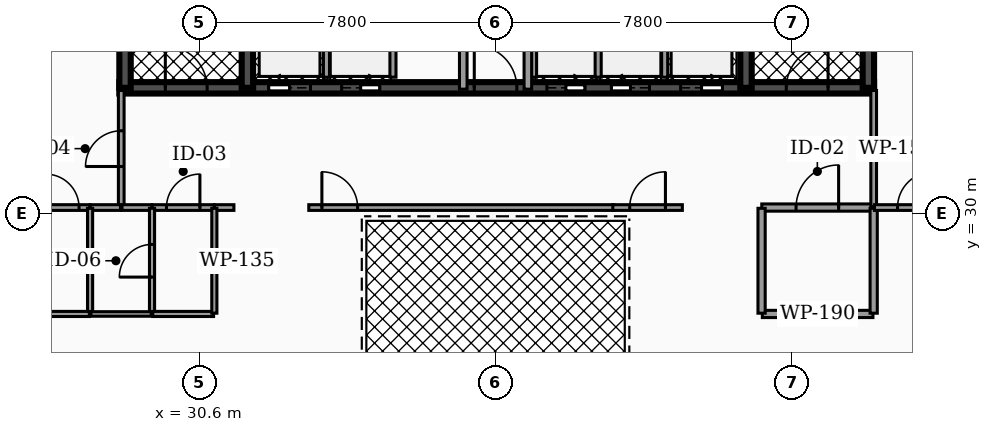
"""IFC4 building model, lengths in metres.
Left out: names, types, materials, properties, quantities, classifications, styles, units other than length and angle.
Written with IfcOpenShell. Run it as: python <this file> out.ifc"""

import sys

from ifc_helpers import new_model, si_unit, direction, frame, frame_2d, origin, place, context, subcontext, project, spatial, rectangle, extrude, element, fill, save


model = new_model("IFC4")
c1 = context("Model", 3, precision=1e-05, world=origin(), true_north=direction((0.0, 1.0)))
c2 = subcontext(c1, "Body", "Model", "MODEL_VIEW")
j1 = project(units=[si_unit("LENGTHUNIT", "METRE"), si_unit("PLANEANGLEUNIT", "RADIAN")], contexts=[c1])
p1 = place(None, origin())
s1 = spatial("IfcSite", under=j1, at=p1, CompositionType="ELEMENT")
p2 = place(p1, origin())
s2 = spatial("IfcBuilding", under=s1, at=p2, CompositionType="ELEMENT")
p3 = place(p2, frame((0.0, 0.0, 222.36)))
s3 = spatial("IfcBuildingStorey", under=s2, at=p3, CompositionType="ELEMENT", Elevation=222.36)
p4 = place(p3, frame((28.5, 33.3, 0.0), z_axis=(0.0, 0.0, 1.0), x_axis=(1.0, 0.0, 0.0)))
e1 = element("IfcWall", 1, at=p4, inside=s3, PredefinedType="SHEAR", context=c2, shape_type="SweptSolid", body=[
    extrude(rectangle(XDim=19.86, YDim=0.3, at=frame_2d((9.93, 0.0))), origin(), (0.0, 0.0, 1.0), 3.18),
])
p5 = place(p4, frame((3.93, 0.0, 0.0)))
e2 = element("IfcOpeningElement", 2, at=p5, cuts=e1, PredefinedType="OPENING", context=c2, shape_type="SweptSolid", body=[
    extrude(rectangle(XDim=1.1, YDim=2.15, at=frame_2d((0.55, 1.075))), frame((0.0, 0.16, 0.0), z_axis=(0.0, -1.0, 0.0), x_axis=(1.0, 0.0, 0.0)), (0.0, 0.0, 1.0), 0.32),
])
p6 = place(p4, frame((14.77, 0.0, 0.0)))
e3 = element("IfcOpeningElement", 3, at=p6, cuts=e1, PredefinedType="OPENING", context=c2, shape_type="SweptSolid", body=[
    extrude(rectangle(XDim=1.1, YDim=2.15, at=frame_2d((0.55, 1.075))), frame((0.0, 0.16, 0.0), z_axis=(0.0, -1.0, 0.0), x_axis=(1.0, 0.0, 0.0)), (0.0, 0.0, 1.0), 0.32),
])
p7 = place(p4, frame((11.25, 0.0, 0.0)))
e4 = element("IfcOpeningElement", 4, at=p7, cuts=e1, PredefinedType="OPENING", context=c2, shape_type="SweptSolid", body=[
    extrude(rectangle(XDim=1.0, YDim=2.1, at=frame_2d((0.5, 1.05))), frame((0.0, 0.16, 0.0), z_axis=(0.0, -1.0, 0.0), x_axis=(1.0, 0.0, 0.0)), (0.0, 0.0, 1.0), 0.32),
])
p8 = place(p4, frame((12.95, 0.0, 0.0)))
e5 = element("IfcOpeningElement", 5, at=p8, cuts=e1, PredefinedType="OPENING", context=c2, shape_type="SweptSolid", body=[
    extrude(rectangle(XDim=1.0, YDim=2.1, at=frame_2d((0.5, 1.05))), frame((0.0, 0.16, 0.0), z_axis=(0.0, -1.0, 0.0), x_axis=(1.0, 0.0, 0.0)), (0.0, 0.0, 1.0), 0.32),
])
p9 = place(p4, frame((5.85, 0.0, 0.0)))
e6 = element("IfcOpeningElement", 6, at=p9, cuts=e1, PredefinedType="OPENING", context=c2, shape_type="SweptSolid", body=[
    extrude(rectangle(XDim=1.0, YDim=2.1, at=frame_2d((0.5, 1.05))), frame((0.0, 0.16, 0.0), z_axis=(0.0, -1.0, 0.0), x_axis=(1.0, 0.0, 0.0)), (0.0, 0.0, 1.0), 0.32),
])
p10 = place(p4, frame((1.21, 0.0, 0.0)))
e7 = element("IfcOpeningElement", 7, at=p10, cuts=e1, PredefinedType="OPENING", context=c2, shape_type="SweptSolid", body=[
    extrude(rectangle(XDim=1.1, YDim=2.2, at=frame_2d((0.55, 1.1))), frame((0.0, 0.16, 0.0), z_axis=(0.0, -1.0, 0.0), x_axis=(1.0, 0.0, 0.0)), (0.0, 0.0, 1.0), 0.32),
])
p11 = place(p4, frame((9.34, 0.0, 0.0)))
e8 = element("IfcOpeningElement", 8, at=p11, cuts=e1, PredefinedType="OPENING", context=c2, shape_type="SweptSolid", body=[
    extrude(rectangle(XDim=1.12, YDim=2.05, at=frame_2d((0.56, 1.025))), frame((0.0, 0.16, 0.0), z_axis=(0.0, -1.0, 0.0), x_axis=(1.0, 0.0, 0.0)), (0.0, 0.0, 1.0), 0.32),
])
p12 = place(p4, frame((17.55, 0.0, 0.0)))
e9 = element("IfcOpeningElement", 9, at=p12, cuts=e1, PredefinedType="OPENING", context=c2, shape_type="SweptSolid", body=[
    extrude(rectangle(XDim=1.1, YDim=2.2, at=frame_2d((0.55, 1.1))), frame((0.0, 0.16, 0.0), z_axis=(0.0, -1.0, 0.0), x_axis=(1.0, 0.0, 0.0)), (0.0, 0.0, 1.0), 0.32),
])
for number, where, z_axis, x_axis in (
    (10, (28.65, 33.3, 0.0), (0.0, 0.0, 1.0), (0.0, 1.0, 0.0)),
    (11, (31.87, 33.3, 0.0), (0.0, 0.0, 1.0), (0.0, 1.0, 0.0)),
    (12, (44.99, 33.3, 0.0), (0.0, 0.0, 1.0), (0.0, 1.0, 0.0)),
    (13, (48.21, 33.3, 0.0), (0.0, 0.0, 1.0), (0.0, 1.0, 0.0)),
):
    element("IfcWall", number, at=place(p3, frame(where, z_axis=z_axis, x_axis=x_axis)), inside=s3, PredefinedType="SHEAR", context=c2, shape_type="SweptSolid", body=[
        extrude(rectangle(XDim=10.1, YDim=0.3, at=frame_2d((5.05, 0.0))), origin(), (0.0, 0.0, 1.0), 3.18),
    ])
for number, where, z_axis, x_axis in (
    (14, (33.95, 33.58, 0.0), (0.0, 0.0, 1.0), (0.0, 1.0, 0.0)),
    (15, (42.85, 33.58, 0.0), (0.0, 0.0, 1.0), (0.0, 1.0, 0.0)),
):
    element("IfcWall", number, at=place(p3, frame(where, z_axis=z_axis, x_axis=x_axis)), inside=s3, PredefinedType="SOLIDWALL", context=c2, shape_type="SweptSolid", body=[
        extrude(rectangle(XDim=2.45, YDim=0.16, at=frame_2d((1.225, 0.0))), origin(), (0.0, 0.0, 1.0), 3.18),
    ])
for number, where, z_axis, x_axis in (
    (16, (39.4, 33.58, 0.0), (0.0, 0.0, 1.0), (0.0, 1.0, 0.0)),
    (17, (41.1, 33.58, 0.0), (0.0, 0.0, 1.0), (0.0, 1.0, 0.0)),
    (18, (35.7, 33.58, 0.0), (0.0, 0.0, 1.0), (0.0, 1.0, 0.0)),
):
    element("IfcWall", number, at=place(p3, frame(where, z_axis=z_axis, x_axis=x_axis)), inside=s3, PredefinedType="SOLIDWALL", context=c2, shape_type="SweptSolid", body=[
        extrude(rectangle(XDim=2.25, YDim=0.16, at=frame_2d((1.125, 0.0))), origin(), (0.0, 0.0, 1.0), 3.18),
    ])
p13 = place(p3, frame((37.55, 33.265, 0.0), z_axis=(0.0, 0.0, 1.0), x_axis=(0.0, 1.0, 0.0)))
e19 = element("IfcWall", 19, at=p13, inside=s3, PredefinedType="PARTITIONING", context=c2, shape_type="SweptSolid", body=[
    extrude(rectangle(XDim=3.615, YDim=0.2, at=frame_2d((1.808, 0.0))), origin(), (0.0, 0.0, 1.0), 2.235),
])
p14 = place(p13, frame((1.367, 0.0, 0.0)))
e20 = element("IfcOpeningElement", 20, at=p14, cuts=e19, PredefinedType="OPENING", context=c2, shape_type="SweptSolid", body=[
    extrude(rectangle(XDim=0.88, YDim=2.05, at=frame_2d((0.44, 1.025))), frame((0.0, 0.11, 0.0), z_axis=(0.0, -1.0, 0.0), x_axis=(1.0, 0.0, 0.0)), (0.0, 0.0, 1.0), 0.22),
])
p15 = place(p3, frame((39.25, 33.265, 0.0), z_axis=(0.0, 0.0, 1.0), x_axis=(0.0, 1.0, 0.0)))
e21 = element("IfcWall", 21, at=p15, inside=s3, PredefinedType="PARTITIONING", context=c2, shape_type="SweptSolid", body=[
    extrude(rectangle(XDim=3.615, YDim=0.2, at=frame_2d((1.808, 0.0))), origin(), (0.0, 0.0, 1.0), 2.235),
])
p16 = place(p3, frame((45.405, 30.15, 0.0), z_axis=(0.0, 0.0, 1.0), x_axis=(1.0, 0.0, 0.0)))
e22 = element("IfcWall", 22, at=p16, inside=s3, PredefinedType="PARTITIONING", context=c2, shape_type="SweptSolid", body=[
    extrude(rectangle(XDim=2.925, YDim=0.19, at=frame_2d((1.462, 0.0))), origin(), (0.0, 0.0, 1.0), 2.235),
])
p17 = place(p16, frame((0.903, 0.0, 0.0)))
e23 = element("IfcOpeningElement", 23, at=p17, cuts=e22, PredefinedType="OPENING", context=c2, shape_type="SweptSolid", body=[
    extrude(rectangle(XDim=1.12, YDim=2.05, at=frame_2d((0.56, 1.025))), frame((0.0, 0.105, 0.0), z_axis=(0.0, -1.0, 0.0), x_axis=(1.0, 0.0, 0.0)), (0.0, 0.0, 1.0), 0.21),
])
p18 = place(p3, frame((28.55, 30.17, 0.0), z_axis=(0.0, 0.0, 1.0), x_axis=(0.0, 1.0, 0.0)))
e24 = element("IfcWall", 24, at=p18, inside=s3, PredefinedType="PARTITIONING", context=c2, shape_type="SweptSolid", body=[
    extrude(rectangle(XDim=3.06, YDim=0.15, at=frame_2d((1.53, 0.0))), origin(), (0.0, 0.0, 1.0), 2.235),
])
p19 = place(p18, frame((1.06, 0.0, 0.0)))
e25 = element("IfcOpeningElement", 25, at=p19, cuts=e24, PredefinedType="OPENING", context=c2, shape_type="SweptSolid", body=[
    extrude(rectangle(XDim=0.94, YDim=2.05, at=frame_2d((0.47, 1.025))), frame((0.0, 0.085, 0.0), z_axis=(0.0, -1.0, 0.0), x_axis=(1.0, 0.0, 0.0)), (0.0, 0.0, 1.0), 0.17),
])
p20 = place(p3, frame((48.35, 30.17, 0.0), z_axis=(0.0, 0.0, 1.0), x_axis=(0.0, 1.0, 0.0)))
e26 = element("IfcWall", 26, at=p20, inside=s3, PredefinedType="PARTITIONING", context=c2, shape_type="SweptSolid", body=[
    extrude(rectangle(XDim=3.06, YDim=0.15, at=frame_2d((1.53, 0.0))), origin(), (0.0, 0.0, 1.0), 2.235),
])
p21 = place(p3, frame((29.365, 30.15, 0.0), z_axis=(0.0, 0.0, 1.0), x_axis=(1.0, 0.0, 0.0)))
e27 = element("IfcWall", 27, at=p21, inside=s3, PredefinedType="PARTITIONING", context=c2, shape_type="SweptSolid", body=[
    extrude(rectangle(XDim=1.63, YDim=0.15, at=frame_2d((0.815, 0.0))), origin(), (0.0, 0.0, 1.0), 2.235),
])
p22 = place(p21, frame((0.375, 0.0, 0.0)))
e28 = element("IfcOpeningElement", 28, at=p22, cuts=e27, PredefinedType="OPENING", context=c2, shape_type="SweptSolid", body=[
    extrude(rectangle(XDim=0.88, YDim=2.05, at=frame_2d((0.44, 1.025))), frame((0.0, 0.085, 0.0), z_axis=(0.0, -1.0, 0.0), x_axis=(1.0, 0.0, 0.0)), (0.0, 0.0, 1.0), 0.17),
])
p23 = place(p3, frame((28.57, 30.15, 0.0), z_axis=(0.0, 0.0, 1.0), x_axis=(1.0, 0.0, 0.0)))
e29 = element("IfcWall", 29, at=p23, inside=s3, PredefinedType="PARTITIONING", context=c2, shape_type="SweptSolid", body=[
    extrude(rectangle(XDim=0.785, YDim=0.15, at=frame_2d((0.393, 0.0))), origin(), (0.0, 0.0, 1.0), 2.235),
])
p24 = place(p3, frame((33.485, 30.15, 0.0), z_axis=(0.0, 0.0, 1.0), x_axis=(1.0, 0.0, 0.0)))
e30 = element("IfcWall", 30, at=p24, inside=s3, PredefinedType="PARTITIONING", context=c2, shape_type="SweptSolid", body=[
    extrude(rectangle(XDim=8.03, YDim=0.15, at=frame_2d((4.015, 0.0))), origin(), (0.0, 0.0, 1.0), 2.235),
])
p25 = place(p24, frame((0.345, 0.0, 0.0)))
e31 = element("IfcOpeningElement", 31, at=p25, cuts=e30, PredefinedType="OPENING", context=c2, shape_type="SweptSolid", body=[
    extrude(rectangle(XDim=0.94, YDim=2.05, at=frame_2d((0.47, 1.025))), frame((0.0, 0.085, 0.0), z_axis=(0.0, -1.0, 0.0), x_axis=(1.0, 0.0, 0.0)), (0.0, 0.0, 1.0), 0.17),
])
p26 = place(p3, frame((31.005, 30.15, 0.0), z_axis=(0.0, 0.0, 1.0), x_axis=(1.0, 0.0, 0.0)))
e32 = element("IfcWall", 32, at=p26, inside=s3, PredefinedType="PARTITIONING", context=c2, shape_type="SweptSolid", body=[
    extrude(rectangle(XDim=0.51, YDim=0.15, at=frame_2d((0.255, 0.0))), origin(), (0.0, 0.0, 1.0), 2.235),
])
p27 = place(p3, frame((41.485, 30.15, 0.0), z_axis=(0.0, 0.0, 1.0), x_axis=(1.0, 0.0, 0.0)))
e33 = element("IfcWall", 33, at=p27, inside=s3, PredefinedType="PARTITIONING", context=c2, shape_type="SweptSolid", body=[
    extrude(rectangle(XDim=1.83, YDim=0.15, at=frame_2d((0.915, 0.0))), origin(), (0.0, 0.0, 1.0), 2.235),
])
p28 = place(p27, frame((0.445, 0.0, 0.0)))
e34 = element("IfcOpeningElement", 34, at=p28, cuts=e33, PredefinedType="OPENING", context=c2, shape_type="SweptSolid", body=[
    extrude(rectangle(XDim=0.94, YDim=2.05, at=frame_2d((0.47, 1.025))), frame((0.0, 0.085, 0.0), z_axis=(0.0, -1.0, 0.0), x_axis=(1.0, 0.0, 0.0)), (0.0, 0.0, 1.0), 0.17),
])
p29 = place(p3, frame((45.42, 27.35, 0.0), z_axis=(0.0, 0.0, 1.0), x_axis=(1.0, 0.0, 0.0)))
e35 = element("IfcWall", 35, at=p29, inside=s3, PredefinedType="PARTITIONING", context=c2, shape_type="SweptSolid", body=[
    extrude(rectangle(XDim=2.91, YDim=0.19, at=frame_2d((1.455, 0.0))), origin(), (0.0, 0.0, 1.0), 2.235),
])
for number, where, z_axis, x_axis in (
    (36, (45.4, 27.37, 0.0), (0.0, 0.0, 1.0), (0.0, 1.0, 0.0)),
    (37, (48.35, 27.37, 0.0), (0.0, 0.0, 1.0), (0.0, 1.0, 0.0)),
):
    element("IfcWall", number, at=place(p3, frame(where, z_axis=z_axis, x_axis=x_axis)), inside=s3, PredefinedType="PARTITIONING", context=c2, shape_type="SweptSolid", body=[
        extrude(rectangle(XDim=2.76, YDim=0.19, at=frame_2d((1.38, 0.0))), origin(), (0.0, 0.0, 1.0), 2.235),
    ])
p30 = place(p3, frame((26.275, 30.15, 0.0), z_axis=(0.0, 0.0, 1.0), x_axis=(1.0, 0.0, 0.0)))
e38 = element("IfcWall", 38, at=p30, inside=s3, PredefinedType="PARTITIONING", context=c2, shape_type="SweptSolid", body=[
    extrude(rectangle(XDim=1.45, YDim=0.15, at=frame_2d((0.725, 0.0))), origin(), (0.0, 0.0, 1.0), 2.235),
])
p31 = place(p30, frame((0.285, 0.0, 0.0)))
e39 = element("IfcOpeningElement", 39, at=p31, cuts=e38, PredefinedType="OPENING", context=c2, shape_type="SweptSolid", body=[
    extrude(rectangle(XDim=0.88, YDim=2.05, at=frame_2d((0.44, 1.025))), frame((0.0, 0.085, 0.0), z_axis=(0.0, -1.0, 0.0), x_axis=(1.0, 0.0, 0.0)), (0.0, 0.0, 1.0), 0.17),
])
p32 = place(p3, frame((27.735, 30.15, 0.0), z_axis=(0.0, 0.0, 1.0), x_axis=(1.0, 0.0, 0.0)))
e40 = element("IfcWall", 40, at=p32, inside=s3, PredefinedType="PARTITIONING", context=c2, shape_type="SweptSolid", body=[
    extrude(rectangle(XDim=0.795, YDim=0.15, at=frame_2d((0.397, 0.0))), origin(), (0.0, 0.0, 1.0), 2.235),
])
p33 = place(p3, frame((48.37, 30.15, 0.0), z_axis=(0.0, 0.0, 1.0), x_axis=(1.0, 0.0, 0.0)))
e41 = element("IfcWall", 41, at=p33, inside=s3, PredefinedType="PARTITIONING", context=c2, shape_type="SweptSolid", body=[
    extrude(rectangle(XDim=2.155, YDim=0.15, at=frame_2d((1.078, 0.0))), origin(), (0.0, 0.0, 1.0), 2.235),
])
p34 = place(p33, frame((0.608, 0.0, 0.0)))
e42 = element("IfcOpeningElement", 42, at=p34, cuts=e41, PredefinedType="OPENING", context=c2, shape_type="SweptSolid", body=[
    extrude(rectangle(XDim=0.94, YDim=2.05, at=frame_2d((0.47, 1.025))), frame((0.0, 0.085, 0.0), z_axis=(0.0, -1.0, 0.0), x_axis=(1.0, 0.0, 0.0)), (0.0, 0.0, 1.0), 0.17),
])
p35 = place(p3, frame((29.36, 27.37, 0.0), z_axis=(0.0, 0.0, 1.0), x_axis=(0.0, 1.0, 0.0)))
e43 = element("IfcWall", 43, at=p35, inside=s3, PredefinedType="PARTITIONING", context=c2, shape_type="SweptSolid", body=[
    extrude(rectangle(XDim=2.76, YDim=0.135, at=frame_2d((1.38, 0.0))), origin(), (0.0, 0.0, 1.0), 2.235),
])
p36 = place(p35, frame((0.95, 0.0, 0.0)))
e44 = element("IfcOpeningElement", 44, at=p36, cuts=e43, PredefinedType="OPENING", context=c2, shape_type="SweptSolid", body=[
    extrude(rectangle(XDim=0.86, YDim=2.05, at=frame_2d((0.43, 1.025))), frame((0.0, 0.077, 0.0), z_axis=(0.0, -1.0, 0.0), x_axis=(1.0, 0.0, 0.0)), (0.0, 0.0, 1.0), 0.155),
])
p37 = place(p3, frame((29.38, 27.35, 0.0), z_axis=(0.0, 0.0, 1.0), x_axis=(1.0, 0.0, 0.0)))
e45 = element("IfcWall", 45, at=p37, inside=s3, PredefinedType="PARTITIONING", context=c2, shape_type="SweptSolid", body=[
    extrude(rectangle(XDim=1.6, YDim=0.135, at=frame_2d((0.8, 0.0))), origin(), (0.0, 0.0, 1.0), 2.235),
])
for number, where, z_axis, x_axis in (
    (46, (31.0, 27.37, 0.0), (0.0, 0.0, 1.0), (0.0, 1.0, 0.0)),
    (47, (27.73, 27.37, 0.0), (0.0, 0.0, 1.0), (0.0, 1.0, 0.0)),
):
    element("IfcWall", number, at=place(p3, frame(where, z_axis=z_axis, x_axis=x_axis)), inside=s3, PredefinedType="PARTITIONING", context=c2, shape_type="SweptSolid", body=[
        extrude(rectangle(XDim=2.76, YDim=0.135, at=frame_2d((1.38, 0.0))), origin(), (0.0, 0.0, 1.0), 2.235),
    ])
p38 = place(p3, frame((26.12, 27.35, 0.0), z_axis=(0.0, 0.0, 1.0), x_axis=(1.0, 0.0, 0.0)))
e48 = element("IfcWall", 48, at=p38, inside=s3, PredefinedType="PARTITIONING", context=c2, shape_type="SweptSolid", body=[
    extrude(rectangle(XDim=1.59, YDim=0.135, at=frame_2d((0.795, 0.0))), origin(), (0.0, 0.0, 1.0), 2.235),
])
p39 = place(p3, frame((27.75, 27.35, 0.0), z_axis=(0.0, 0.0, 1.0), x_axis=(1.0, 0.0, 0.0)))
e49 = element("IfcWall", 49, at=p39, inside=s3, PredefinedType="PARTITIONING", context=c2, shape_type="SweptSolid", body=[
    extrude(rectangle(XDim=1.59, YDim=0.12, at=frame_2d((0.795, 0.0))), origin(), (0.0, 0.0, 1.0), 2.235),
])
p40 = place(p5, origin())
e50 = element("IfcDoor", 50, at=p40, inside=s3, OperationType="SLIDING_TO_LEFT", PredefinedType="DOOR", context=c2, shape_type="SweptSolid", body=[
    extrude(rectangle(XDim=1.1, YDim=2.15, at=frame_2d((0.55, 1.075))), frame((0.0, 0.025, 0.0), z_axis=(0.0, -1.0, 0.0), x_axis=(1.0, 0.0, 0.0)), (0.0, 0.0, 1.0), 0.05),
])
fill(e2, e50)
p41 = place(p6, origin())
e51 = element("IfcDoor", 51, at=p41, inside=s3, OperationType="SLIDING_TO_RIGHT", PredefinedType="DOOR", context=c2, shape_type="SweptSolid", body=[
    extrude(rectangle(XDim=1.1, YDim=2.15, at=frame_2d((0.55, 1.075))), frame((0.0, 0.025, 0.0), z_axis=(0.0, -1.0, 0.0), x_axis=(1.0, 0.0, 0.0)), (0.0, 0.0, 1.0), 0.05),
])
fill(e3, e51)
p42 = place(p7, origin())
e52 = element("IfcDoor", 52, at=p42, inside=s3, OperationType="SLIDING_TO_RIGHT", PredefinedType="DOOR", context=c2, shape_type="SweptSolid", body=[
    extrude(rectangle(XDim=1.0, YDim=2.1, at=frame_2d((0.5, 1.05))), frame((0.0, 0.025, 0.0), z_axis=(0.0, -1.0, 0.0), x_axis=(1.0, 0.0, 0.0)), (0.0, 0.0, 1.0), 0.05),
])
fill(e4, e52)
p43 = place(p8, origin())
e53 = element("IfcDoor", 53, at=p43, inside=s3, OperationType="SLIDING_TO_LEFT", PredefinedType="DOOR", context=c2, shape_type="SweptSolid", body=[
    extrude(rectangle(XDim=1.0, YDim=2.1, at=frame_2d((0.5, 1.05))), frame((0.0, 0.025, 0.0), z_axis=(0.0, -1.0, 0.0), x_axis=(1.0, 0.0, 0.0)), (0.0, 0.0, 1.0), 0.05),
])
fill(e5, e53)
p44 = place(p9, origin())
e54 = element("IfcDoor", 54, at=p44, inside=s3, OperationType="SLIDING_TO_RIGHT", PredefinedType="DOOR", context=c2, shape_type="SweptSolid", body=[
    extrude(rectangle(XDim=1.0, YDim=2.1, at=frame_2d((0.5, 1.05))), frame((0.0, 0.025, 0.0), z_axis=(0.0, -1.0, 0.0), x_axis=(1.0, 0.0, 0.0)), (0.0, 0.0, 1.0), 0.05),
])
fill(e6, e54)
p45 = place(p10, origin())
e55 = element("IfcDoor", 55, at=p45, inside=s3, OperationType="SINGLE_SWING_LEFT", PredefinedType="DOOR", context=c2, shape_type="SweptSolid", body=[
    extrude(rectangle(XDim=1.1, YDim=2.2, at=frame_2d((0.55, 1.1))), frame((0.0, 0.025, 0.0), z_axis=(0.0, -1.0, 0.0), x_axis=(1.0, 0.0, 0.0)), (0.0, 0.0, 1.0), 0.05),
])
fill(e7, e55)
p46 = place(p11, origin())
e56 = element("IfcDoor", 56, at=p46, inside=s3, OperationType="SINGLE_SWING_LEFT", PredefinedType="DOOR", context=c2, shape_type="SweptSolid", body=[
    extrude(rectangle(XDim=1.12, YDim=2.05, at=frame_2d((0.56, 1.025))), frame((0.0, 0.025, 0.0), z_axis=(0.0, -1.0, 0.0), x_axis=(1.0, 0.0, 0.0)), (0.0, 0.0, 1.0), 0.05),
])
fill(e8, e56)
p47 = place(p12, origin())
e57 = element("IfcDoor", 57, at=p47, inside=s3, OperationType="SINGLE_SWING_RIGHT", PredefinedType="DOOR", context=c2, shape_type="SweptSolid", body=[
    extrude(rectangle(XDim=1.1, YDim=2.2, at=frame_2d((0.55, 1.1))), frame((0.0, 0.025, 0.0), z_axis=(0.0, -1.0, 0.0), x_axis=(1.0, 0.0, 0.0)), (0.0, 0.0, 1.0), 0.05),
])
fill(e9, e57)
p48 = place(p17, origin())
e58 = element("IfcDoor", 58, at=p48, inside=s3, OperationType="SINGLE_SWING_RIGHT", PredefinedType="DOOR", context=c2, shape_type="SweptSolid", body=[
    extrude(rectangle(XDim=1.12, YDim=2.05, at=frame_2d((0.56, 1.025))), frame((0.0, 0.025, 0.0), z_axis=(0.0, -1.0, 0.0), x_axis=(1.0, 0.0, 0.0)), (0.0, 0.0, 1.0), 0.05),
])
fill(e23, e58)
p49 = place(p19, origin())
e59 = element("IfcDoor", 59, at=p49, inside=s3, OperationType="SINGLE_SWING_LEFT", PredefinedType="DOOR", context=c2, shape_type="SweptSolid", body=[
    extrude(rectangle(XDim=0.94, YDim=2.05, at=frame_2d((0.47, 1.025))), frame((0.0, 0.025, 0.0), z_axis=(0.0, -1.0, 0.0), x_axis=(1.0, 0.0, 0.0)), (0.0, 0.0, 1.0), 0.05),
])
fill(e25, e59)
p50 = place(p22, origin())
e60 = element("IfcDoor", 60, at=p50, inside=s3, OperationType="SINGLE_SWING_RIGHT", PredefinedType="DOOR", context=c2, shape_type="SweptSolid", body=[
    extrude(rectangle(XDim=0.88, YDim=2.05, at=frame_2d((0.44, 1.025))), frame((0.0, 0.025, 0.0), z_axis=(0.0, -1.0, 0.0), x_axis=(1.0, 0.0, 0.0)), (0.0, 0.0, 1.0), 0.05),
])
fill(e28, e60)
p51 = place(p25, origin())
e61 = element("IfcDoor", 61, at=p51, inside=s3, OperationType="SINGLE_SWING_LEFT", PredefinedType="DOOR", context=c2, shape_type="SweptSolid", body=[
    extrude(rectangle(XDim=0.94, YDim=2.05, at=frame_2d((0.47, 1.025))), frame((0.0, 0.025, 0.0), z_axis=(0.0, -1.0, 0.0), x_axis=(1.0, 0.0, 0.0)), (0.0, 0.0, 1.0), 0.05),
])
fill(e31, e61)
p52 = place(p28, origin())
e62 = element("IfcDoor", 62, at=p52, inside=s3, OperationType="SINGLE_SWING_RIGHT", PredefinedType="DOOR", context=c2, shape_type="SweptSolid", body=[
    extrude(rectangle(XDim=0.94, YDim=2.05, at=frame_2d((0.47, 1.025))), frame((0.0, 0.025, 0.0), z_axis=(0.0, -1.0, 0.0), x_axis=(1.0, 0.0, 0.0)), (0.0, 0.0, 1.0), 0.05),
])
fill(e34, e62)
p53 = place(p31, origin())
e63 = element("IfcDoor", 63, at=p53, inside=s3, OperationType="SINGLE_SWING_LEFT", PredefinedType="DOOR", context=c2, shape_type="SweptSolid", body=[
    extrude(rectangle(XDim=0.88, YDim=2.05, at=frame_2d((0.44, 1.025))), frame((0.0, 0.025, 0.0), z_axis=(0.0, -1.0, 0.0), x_axis=(1.0, 0.0, 0.0)), (0.0, 0.0, 1.0), 0.05),
])
fill(e39, e63)
p54 = place(p34, origin())
e64 = element("IfcDoor", 64, at=p54, inside=s3, OperationType="SINGLE_SWING_RIGHT", PredefinedType="DOOR", context=c2, shape_type="SweptSolid", body=[
    extrude(rectangle(XDim=0.94, YDim=2.05, at=frame_2d((0.47, 1.025))), frame((0.0, 0.025, 0.0), z_axis=(0.0, -1.0, 0.0), x_axis=(1.0, 0.0, 0.0)), (0.0, 0.0, 1.0), 0.05),
])
fill(e42, e64)
p55 = place(p36, origin())
e65 = element("IfcDoor", 65, at=p55, inside=s3, OperationType="SINGLE_SWING_LEFT", PredefinedType="DOOR", context=c2, shape_type="SweptSolid", body=[
    extrude(rectangle(XDim=0.86, YDim=2.05, at=frame_2d((0.43, 1.025))), frame((0.0, 0.025, 0.0), z_axis=(0.0, -1.0, 0.0), x_axis=(1.0, 0.0, 0.0)), (0.0, 0.0, 1.0), 0.05),
])
fill(e44, e65)
save(model, sys.argv[1])
